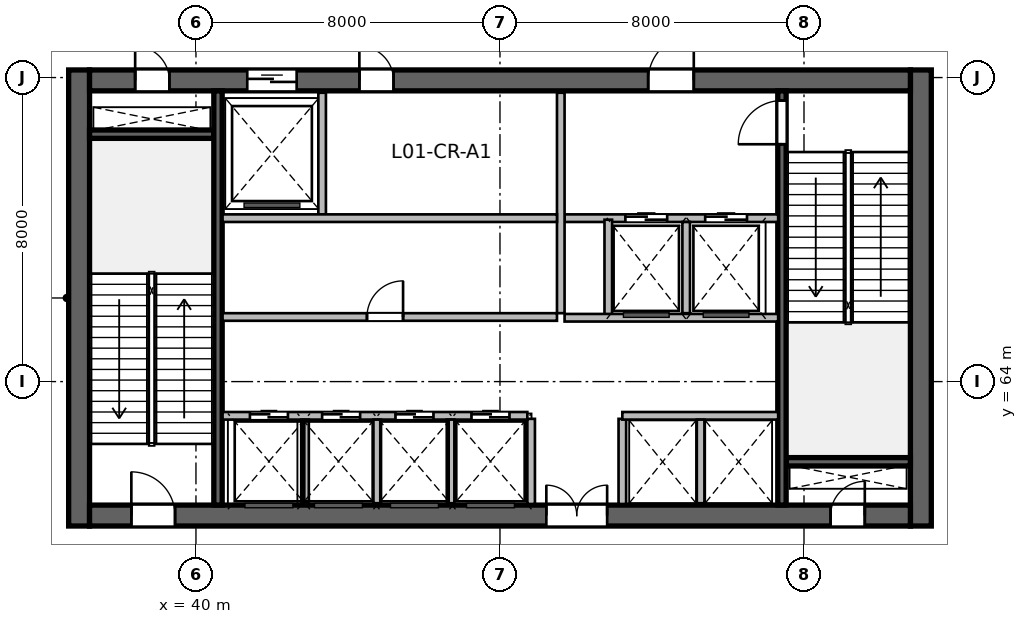
"""IFC4 building model, lengths in metres.
Left out: names, types, materials, properties, quantities, classifications, styles, units other than length and angle.
Written with IfcOpenShell. Run it as: python <this file> out.ifc"""

import sys

from ifc_helpers import new_model, si_unit, direction, frame, frame_2d, origin, place, context, subcontext, project, spatial, rectangle, extrude, source, transform, mapped, element, fill, save


model = new_model("IFC4")
c1 = context("Model", 3, precision=1e-05, world=origin(), true_north=direction((0.0, 1.0)))
c2 = subcontext(c1, "Body", "Model", "MODEL_VIEW")
j1 = project(units=[si_unit("LENGTHUNIT", "METRE"), si_unit("PLANEANGLEUNIT", "RADIAN")], contexts=[c1])
p1 = place(None, origin())
s1 = spatial("IfcSite", under=j1, at=p1, CompositionType="ELEMENT")
p2 = place(p1, origin())
s2 = spatial("IfcBuilding", under=s1, at=p2, CompositionType="ELEMENT")
p3 = place(p2, frame((0.0, 0.0, 6.0)))
s3 = spatial("IfcBuildingStorey", under=s2, at=p3, CompositionType="ELEMENT", Elevation=6.0)
m1 = source(origin(), c2, "Body", "SweptSolid", [
    extrude(rectangle(XDim=12.0, YDim=0.55, at=frame_2d((6.0, 0.0))), origin(), (0.0, 0.0, 1.0), 6.0),
])
for number, where, z_axis, x_axis in (
    (1, (36.925, 60.2, 0.0), (0.0, 0.0, 1.0), (0.0, 1.0, 0.0)),
    (2, (59.075, 60.2, 0.0), (0.0, 0.0, 1.0), (0.0, 1.0, 0.0)),
):
    element("IfcWall", number, at=place(p3, frame(where, z_axis=z_axis, x_axis=x_axis)), inside=s3, PredefinedType="SHEAR", context=c2, shape_type="MappedRepresentation", body=[
        mapped(m1, transform((0.0, 0.0, 0.0), scale=1.0)),
    ])
m2 = source(origin(), c2, "Body", "SweptSolid", [
    extrude(rectangle(XDim=21.6, YDim=0.55, at=frame_2d((10.8, 0.0))), origin(), (0.0, 0.0, 1.0), 6.0),
])
p4 = place(p3, frame((37.2, 60.475, 0.0), z_axis=(0.0, 0.0, 1.0), x_axis=(1.0, 0.0, 0.0)))
e3 = element("IfcWall", 3, at=p4, inside=s3, PredefinedType="SHEAR", context=c2, shape_type="MappedRepresentation", body=[
    mapped(m2, transform((0.0, 0.0, 0.0), scale=1.0)),
])
p5 = place(p4, frame((1.1, 0.0, 0.0)))
e4 = element("IfcOpeningElement", 4, at=p5, cuts=e3, PredefinedType="OPENING", context=c2, shape_type="SweptSolid", body=[
    extrude(rectangle(XDim=1.15, YDim=2.15, at=frame_2d((0.575, 1.075))), frame((0.0, 0.285, 0.0), z_axis=(0.0, -1.0, 0.0), x_axis=(1.0, 0.0, 0.0)), (0.0, 0.0, 1.0), 0.57),
])
p6 = place(p4, frame((19.5, 0.0, 0.0)))
e5 = element("IfcOpeningElement", 5, at=p6, cuts=e3, PredefinedType="OPENING", context=c2, shape_type="SweptSolid", body=[
    extrude(rectangle(XDim=0.9, YDim=2.1, at=frame_2d((0.45, 1.05))), frame((0.0, 0.285, 0.0), z_axis=(0.0, -1.0, 0.0), x_axis=(1.0, 0.0, 0.0)), (0.0, 0.0, 1.0), 0.57),
])
p7 = place(p4, frame((12.02, 0.0, 0.0)))
e6 = element("IfcOpeningElement", 6, at=p7, cuts=e3, PredefinedType="OPENING", context=c2, shape_type="SweptSolid", body=[
    extrude(rectangle(XDim=1.6, YDim=2.15, at=frame_2d((0.8, 1.075))), frame((0.0, 0.285, 0.0), z_axis=(0.0, -1.0, 0.0), x_axis=(1.0, 0.0, 0.0)), (0.0, 0.0, 1.0), 0.57),
])
p8 = place(p3, frame((37.2, 71.925, 0.0), z_axis=(0.0, 0.0, 1.0), x_axis=(1.0, 0.0, 0.0)))
e7 = element("IfcWall", 7, at=p8, inside=s3, PredefinedType="SHEAR", context=c2, shape_type="MappedRepresentation", body=[
    mapped(m2, transform((0.0, 0.0, 0.0), scale=1.0)),
])
p9 = place(p8, frame((1.2, 0.0, 0.0)))
e8 = element("IfcOpeningElement", 8, at=p9, cuts=e7, PredefinedType="OPENING", context=c2, shape_type="SweptSolid", body=[
    extrude(rectangle(XDim=0.9, YDim=2.1, at=frame_2d((0.45, 1.05))), frame((0.0, 0.285, 0.0), z_axis=(0.0, -1.0, 0.0), x_axis=(1.0, 0.0, 0.0)), (0.0, 0.0, 1.0), 0.57),
])
p10 = place(p8, frame((14.7, 0.0, 0.0)))
e9 = element("IfcOpeningElement", 9, at=p10, cuts=e7, PredefinedType="OPENING", context=c2, shape_type="SweptSolid", body=[
    extrude(rectangle(XDim=1.2, YDim=2.15, at=frame_2d((0.6, 1.075))), frame((0.0, 0.285, 0.0), z_axis=(0.0, -1.0, 0.0), x_axis=(1.0, 0.0, 0.0)), (0.0, 0.0, 1.0), 0.57),
])
p11 = place(p8, frame((4.15, 0.0, 0.0)))
e10 = element("IfcOpeningElement", 10, at=p11, cuts=e7, PredefinedType="OPENING", context=c2, shape_type="SweptSolid", body=[
    extrude(rectangle(XDim=1.3, YDim=2.15, at=frame_2d((0.65, 1.075))), frame((0.0, 0.285, 0.0), z_axis=(0.0, -1.0, 0.0), x_axis=(1.0, 0.0, 0.0)), (0.0, 0.0, 1.0), 0.57),
])
p12 = place(p8, frame((7.1, 0.0, 0.0)))
e11 = element("IfcOpeningElement", 11, at=p12, cuts=e7, PredefinedType="OPENING", context=c2, shape_type="SweptSolid", body=[
    extrude(rectangle(XDim=0.9, YDim=2.1, at=frame_2d((0.45, 1.05))), frame((0.0, 0.285, 0.0), z_axis=(0.0, -1.0, 0.0), x_axis=(1.0, 0.0, 0.0)), (0.0, 0.0, 1.0), 0.57),
])
m3 = source(origin(), c2, "Body", "SweptSolid", [
    extrude(rectangle(XDim=3.27, YDim=0.22, at=frame_2d((1.635, 0.0))), origin(), (0.0, 0.0, 1.0), 6.0),
])
for number, where, z_axis, x_axis in (
    (12, (37.2, 70.51, 0.0), (0.0, 0.0, 1.0), (1.0, 0.0, 0.0)),
    (13, (55.53, 61.89, 0.0), (0.0, 0.0, 1.0), (1.0, 0.0, 0.0)),
):
    element("IfcWall", number, at=place(p3, frame(where, z_axis=z_axis, x_axis=x_axis)), inside=s3, PredefinedType="SHEAR", context=c2, shape_type="MappedRepresentation", body=[
        mapped(m3, transform((0.0, 0.0, 0.0), scale=1.0)),
    ])
m4 = source(origin(), c2, "Body", "SweptSolid", [
    extrude(rectangle(XDim=10.9, YDim=0.22, at=frame_2d((5.45, 0.0))), origin(), (0.0, 0.0, 1.0), 6.0),
])
p13 = place(p3, frame((40.58, 60.75, 0.0), z_axis=(0.0, 0.0, 1.0), x_axis=(0.0, 1.0, 0.0)))
e14 = element("IfcWall", 14, at=p13, inside=s3, PredefinedType="SHEAR", context=c2, shape_type="MappedRepresentation", body=[
    mapped(m4, transform((0.0, 0.0, 0.0), scale=1.0)),
])
p14 = place(p3, frame((55.42, 60.75, 0.0), z_axis=(0.0, 0.0, 1.0), x_axis=(0.0, 1.0, 0.0)))
e15 = element("IfcWall", 15, at=p14, inside=s3, PredefinedType="SHEAR", context=c2, shape_type="MappedRepresentation", body=[
    mapped(m4, transform((0.0, 0.0, 0.0), scale=1.0)),
])
p15 = place(p14, frame((9.495, 0.0, 0.0)))
e16 = element("IfcOpeningElement", 16, at=p15, cuts=e15, PredefinedType="OPENING", context=c2, shape_type="SweptSolid", body=[
    extrude(rectangle(XDim=1.15, YDim=2.15, at=frame_2d((0.575, 1.075))), frame((0.0, 0.12, 0.0), z_axis=(0.0, -1.0, 0.0), x_axis=(1.0, 0.0, 0.0)), (0.0, 0.0, 1.0), 0.24),
])
m5 = source(origin(), c2, "Body", "SweptSolid", [
    extrude(rectangle(XDim=2.24, YDim=0.2, at=frame_2d((1.12, 0.0))), origin(), (0.0, 0.0, 1.0), 5.7),
])
for number, where, z_axis, x_axis in (
    (17, (48.82, 60.78, 0.0), (0.0, 0.0, 1.0), (0.0, 1.0, 0.0)),
    (18, (51.22, 60.78, 0.0), (0.0, 0.0, 1.0), (0.0, 1.0, 0.0)),
):
    element("IfcWall", number, at=place(p3, frame(where, z_axis=z_axis, x_axis=x_axis)), inside=s3, PredefinedType="SOLIDWALL", context=c2, shape_type="MappedRepresentation", body=[
        mapped(m5, transform((0.0, 0.0, 0.0), scale=1.0)),
    ])
m6 = source(origin(), c2, "Body", "SweptSolid", [
    extrude(rectangle(XDim=5.62, YDim=0.2, at=frame_2d((2.81, 0.0))), origin(), (0.0, 0.0, 1.0), 5.7),
])
p16 = place(p3, frame((49.7, 68.3, 0.0), z_axis=(0.0, 0.0, 1.0), x_axis=(1.0, 0.0, 0.0)))
e19 = element("IfcWall", 19, at=p16, inside=s3, PredefinedType="SOLIDWALL", context=c2, shape_type="MappedRepresentation", body=[
    mapped(m6, transform((0.0, 0.0, 0.0), scale=1.0)),
])
p17 = place(p16, frame((1.6, 0.0, 0.0)))
e20 = element("IfcOpeningElement", 20, at=p17, cuts=e19, PredefinedType="OPENING", context=c2, shape_type="SweptSolid", body=[
    extrude(rectangle(XDim=1.1, YDim=2.15, at=frame_2d((0.55, 1.075))), frame((0.0, 0.11, 0.0), z_axis=(0.0, -1.0, 0.0), x_axis=(1.0, 0.0, 0.0)), (0.0, 0.0, 1.0), 0.22),
])
p18 = place(p16, frame((3.7, 0.0, 0.0)))
e21 = element("IfcOpeningElement", 21, at=p18, cuts=e19, PredefinedType="OPENING", context=c2, shape_type="SweptSolid", body=[
    extrude(rectangle(XDim=1.1, YDim=2.15, at=frame_2d((0.55, 1.075))), frame((0.0, 0.11, 0.0), z_axis=(0.0, -1.0, 0.0), x_axis=(1.0, 0.0, 0.0)), (0.0, 0.0, 1.0), 0.22),
])
m7 = source(origin(), c2, "Body", "SweptSolid", [
    extrude(rectangle(XDim=5.8, YDim=0.2, at=frame_2d((2.9, 0.0))), origin(), (0.0, 0.0, 1.0), 5.7),
])
p19 = place(p3, frame((49.6, 65.8, 0.0), z_axis=(0.0, 0.0, 1.0), x_axis=(0.0, 1.0, 0.0)))
e22 = element("IfcWall", 22, at=p19, inside=s3, PredefinedType="SOLIDWALL", context=c2, shape_type="MappedRepresentation", body=[
    mapped(m7, transform((0.0, 0.0, 0.0), scale=1.0)),
])
m8 = source(origin(), c2, "Body", "SweptSolid", [
    extrude(rectangle(XDim=2.58, YDim=0.2, at=frame_2d((1.29, 0.0))), origin(), (0.0, 0.0, 1.0), 5.7),
])
p20 = place(p3, frame((50.85, 65.68, 0.0), z_axis=(0.0, 0.0, 1.0), x_axis=(0.0, 1.0, 0.0)))
e23 = element("IfcWall", 23, at=p20, inside=s3, PredefinedType="SOLIDWALL", context=c2, shape_type="MappedRepresentation", body=[
    mapped(m8, transform((0.0, 0.0, 0.0), scale=1.0)),
])
m9 = source(origin(), c2, "Body", "SweptSolid", [
    extrude(rectangle(XDim=2.4, YDim=0.2, at=frame_2d((1.2, 0.0))), origin(), (0.0, 0.0, 1.0), 5.7),
])
p21 = place(p3, frame((52.9, 65.8, 0.0), z_axis=(0.0, 0.0, 1.0), x_axis=(0.0, 1.0, 0.0)))
e24 = element("IfcWall", 24, at=p21, inside=s3, PredefinedType="SOLIDWALL", context=c2, shape_type="MappedRepresentation", body=[
    mapped(m9, transform((0.0, 0.0, 0.0), scale=1.0)),
])
p22 = place(p3, frame((49.7, 65.68, 0.0), z_axis=(0.0, 0.0, 1.0), x_axis=(1.0, 0.0, 0.0)))
e25 = element("IfcWall", 25, at=p22, inside=s3, PredefinedType="SOLIDWALL", context=c2, shape_type="MappedRepresentation", body=[
    mapped(m6, transform((0.0, 0.0, 0.0), scale=1.0)),
])
m10 = source(origin(), c2, "Body", "SweptSolid", [
    extrude(rectangle(XDim=3.2, YDim=0.2, at=frame_2d((1.6, 0.0))), origin(), (0.0, 0.0, 1.0), 5.7),
])
p23 = place(p3, frame((43.32, 68.4, 0.0), z_axis=(0.0, 0.0, 1.0), x_axis=(0.0, 1.0, 0.0)))
e26 = element("IfcWall", 26, at=p23, inside=s3, PredefinedType="SOLIDWALL", context=c2, shape_type="MappedRepresentation", body=[
    mapped(m10, transform((0.0, 0.0, 0.0), scale=1.0)),
])
m11 = source(origin(), c2, "Body", "SweptSolid", [
    extrude(rectangle(XDim=8.8, YDim=0.2, at=frame_2d((4.4, 0.0))), origin(), (0.0, 0.0, 1.0), 5.7),
])
p24 = place(p3, frame((40.7, 68.3, 0.0), z_axis=(0.0, 0.0, 1.0), x_axis=(1.0, 0.0, 0.0)))
e27 = element("IfcWall", 27, at=p24, inside=s3, PredefinedType="SOLIDWALL", context=c2, shape_type="MappedRepresentation", body=[
    mapped(m11, transform((0.0, 0.0, 0.0), scale=1.0)),
])
m12 = source(origin(), c2, "Body", "SweptSolid", [
    extrude(rectangle(XDim=8.02, YDim=0.2, at=frame_2d((4.01, 0.0))), origin(), (0.0, 0.0, 1.0), 5.7),
])
p25 = place(p3, frame((40.7, 63.1, 0.0), z_axis=(0.0, 0.0, 1.0), x_axis=(1.0, 0.0, 0.0)))
e28 = element("IfcWall", 28, at=p25, inside=s3, PredefinedType="SOLIDWALL", context=c2, shape_type="MappedRepresentation", body=[
    mapped(m12, transform((0.0, 0.0, 0.0), scale=1.0)),
])
p26 = place(p25, frame((0.72, 0.0, 0.0)))
e29 = element("IfcOpeningElement", 29, at=p26, cuts=e28, PredefinedType="OPENING", context=c2, shape_type="SweptSolid", body=[
    extrude(rectangle(XDim=1.0, YDim=2.15, at=frame_2d((0.5, 1.075))), frame((0.0, 0.11, 0.0), z_axis=(0.0, -1.0, 0.0), x_axis=(1.0, 0.0, 0.0)), (0.0, 0.0, 1.0), 0.22),
])
p27 = place(p25, frame((2.62, 0.0, 0.0)))
e30 = element("IfcOpeningElement", 30, at=p27, cuts=e28, PredefinedType="OPENING", context=c2, shape_type="SweptSolid", body=[
    extrude(rectangle(XDim=1.0, YDim=2.15, at=frame_2d((0.5, 1.075))), frame((0.0, 0.11, 0.0), z_axis=(0.0, -1.0, 0.0), x_axis=(1.0, 0.0, 0.0)), (0.0, 0.0, 1.0), 0.22),
])
p28 = place(p25, frame((4.55, 0.0, 0.0)))
e31 = element("IfcOpeningElement", 31, at=p28, cuts=e28, PredefinedType="OPENING", context=c2, shape_type="SweptSolid", body=[
    extrude(rectangle(XDim=1.0, YDim=2.15, at=frame_2d((0.5, 1.075))), frame((0.0, 0.11, 0.0), z_axis=(0.0, -1.0, 0.0), x_axis=(1.0, 0.0, 0.0)), (0.0, 0.0, 1.0), 0.22),
])
p29 = place(p25, frame((6.55, 0.0, 0.0)))
e32 = element("IfcOpeningElement", 32, at=p29, cuts=e28, PredefinedType="OPENING", context=c2, shape_type="SweptSolid", body=[
    extrude(rectangle(XDim=1.0, YDim=2.15, at=frame_2d((0.5, 1.075))), frame((0.0, 0.11, 0.0), z_axis=(0.0, -1.0, 0.0), x_axis=(1.0, 0.0, 0.0)), (0.0, 0.0, 1.0), 0.22),
])
m13 = source(origin(), c2, "Body", "SweptSolid", [
    extrude(rectangle(XDim=4.1, YDim=0.2, at=frame_2d((2.05, 0.0))), origin(), (0.0, 0.0, 1.0), 5.7),
])
p30 = place(p3, frame((51.22, 63.1, 0.0), z_axis=(0.0, 0.0, 1.0), x_axis=(1.0, 0.0, 0.0)))
e33 = element("IfcWall", 33, at=p30, inside=s3, PredefinedType="SOLIDWALL", context=c2, shape_type="MappedRepresentation", body=[
    mapped(m13, transform((0.0, 0.0, 0.0), scale=1.0)),
])
m14 = source(origin(), c2, "Body", "SweptSolid", [
    extrude(rectangle(XDim=2.2, YDim=0.2, at=frame_2d((1.1, 0.0))), origin(), (0.0, 0.0, 1.0), 5.7),
])
for number, where, z_axis, x_axis in (
    (34, (42.87, 60.8, 0.0), (0.0, 0.0, 1.0), (0.0, 1.0, 0.0)),
    (35, (44.77, 60.8, 0.0), (0.0, 0.0, 1.0), (0.0, 1.0, 0.0)),
    (36, (46.7, 60.8, 0.0), (0.0, 0.0, 1.0), (0.0, 1.0, 0.0)),
    (37, (53.28, 60.8, 0.0), (0.0, 0.0, 1.0), (0.0, 1.0, 0.0)),
):
    element("IfcWall", number, at=place(p3, frame(where, z_axis=z_axis, x_axis=x_axis)), inside=s3, PredefinedType="SOLIDWALL", context=c2, shape_type="MappedRepresentation", body=[
        mapped(m14, transform((0.0, 0.0, 0.0), scale=1.0)),
    ])
p31 = place(p3, frame((40.7, 65.7, 0.0), z_axis=(0.0, 0.0, 1.0), x_axis=(1.0, 0.0, 0.0)))
e38 = element("IfcWall", 38, at=p31, inside=s3, PredefinedType="SOLIDWALL", context=c2, shape_type="MappedRepresentation", body=[
    mapped(m11, transform((0.0, 0.0, 0.0), scale=1.0)),
])
p32 = place(p31, frame((3.8, 0.0, 0.0)))
e39 = element("IfcOpeningElement", 39, at=p32, cuts=e38, PredefinedType="OPENING", context=c2, shape_type="SweptSolid", body=[
    extrude(rectangle(XDim=0.95, YDim=2.15, at=frame_2d((0.475, 1.075))), frame((0.0, 0.11, 0.0), z_axis=(0.0, -1.0, 0.0), x_axis=(1.0, 0.0, 0.0)), (0.0, 0.0, 1.0), 0.22),
])
m15 = source(origin(), c2, "Body", "SweptSolid", [
    extrude(rectangle(XDim=1.15, YDim=2.15, at=frame_2d((0.575, 1.075))), frame((0.0, 0.025, 0.0), z_axis=(0.0, -1.0, 0.0), x_axis=(1.0, 0.0, 0.0)), (0.0, 0.0, 1.0), 0.05),
])
p33 = place(p5, origin())
e40 = element("IfcDoor", 40, at=p33, inside=s3, OperationType="SINGLE_SWING_LEFT", PredefinedType="DOOR", context=c2, shape_type="MappedRepresentation", body=[
    mapped(m15, transform((0.0, 0.0, 0.0), scale=1.0)),
])
fill(e4, e40)
m16 = source(origin(), c2, "Body", "SweptSolid", [
    extrude(rectangle(XDim=0.9, YDim=2.1, at=frame_2d((0.45, 1.05))), frame((0.0, 0.025, 0.0), z_axis=(0.0, -1.0, 0.0), x_axis=(1.0, 0.0, 0.0)), (0.0, 0.0, 1.0), 0.05),
])
p34 = place(p9, origin())
e41 = element("IfcDoor", 41, at=p34, inside=s3, OperationType="SINGLE_SWING_LEFT", PredefinedType="DOOR", context=c2, shape_type="MappedRepresentation", body=[
    mapped(m16, transform((0.0, 0.0, 0.0), scale=1.0)),
])
fill(e8, e41)
p35 = place(p6, origin())
e42 = element("IfcDoor", 42, at=p35, inside=s3, OperationType="SINGLE_SWING_RIGHT", PredefinedType="DOOR", context=c2, shape_type="MappedRepresentation", body=[
    mapped(m16, transform((0.0, 0.0, 0.0), scale=1.0)),
])
fill(e5, e42)
p36 = place(p15, origin())
e43 = element("IfcDoor", 43, at=p36, inside=s3, OperationType="SINGLE_SWING_LEFT", PredefinedType="DOOR", context=c2, shape_type="MappedRepresentation", body=[
    mapped(m15, transform((0.0, 0.0, 0.0), scale=1.0)),
])
fill(e16, e43)
m17 = source(origin(), c2, "Body", "SweptSolid", [
    extrude(rectangle(XDim=1.6, YDim=2.15, at=frame_2d((0.8, 1.075))), frame((0.0, 0.025, 0.0), z_axis=(0.0, -1.0, 0.0), x_axis=(1.0, 0.0, 0.0)), (0.0, 0.0, 1.0), 0.05),
])
p37 = place(p7, origin())
e44 = element("IfcDoor", 44, at=p37, inside=s3, OperationType="DOUBLE_DOOR_SINGLE_SWING", PredefinedType="DOOR", context=c2, shape_type="MappedRepresentation", body=[
    mapped(m17, transform((0.0, 0.0, 0.0), scale=1.0)),
])
fill(e6, e44)
m18 = source(origin(), c2, "Body", "SweptSolid", [
    extrude(rectangle(XDim=1.2, YDim=2.15, at=frame_2d((0.6, 1.075))), frame((0.0, 0.025, 0.0), z_axis=(0.0, -1.0, 0.0), x_axis=(1.0, 0.0, 0.0)), (0.0, 0.0, 1.0), 0.05),
])
p38 = place(p10, origin())
e45 = element("IfcDoor", 45, at=p38, inside=s3, OperationType="SINGLE_SWING_RIGHT", PredefinedType="DOOR", context=c2, shape_type="MappedRepresentation", body=[
    mapped(m18, transform((0.0, 0.0, 0.0), scale=1.0)),
])
fill(e9, e45)
m19 = source(origin(), c2, "Body", "SweptSolid", [
    extrude(rectangle(XDim=1.1, YDim=2.15, at=frame_2d((0.55, 1.075))), frame((0.0, 0.025, 0.0), z_axis=(0.0, -1.0, 0.0), x_axis=(1.0, 0.0, 0.0)), (0.0, 0.0, 1.0), 0.05),
])
p39 = place(p17, origin())
e46 = element("IfcDoor", 46, at=p39, inside=s3, OperationType="DOUBLE_DOOR_SLIDING", PredefinedType="DOOR", context=c2, shape_type="MappedRepresentation", body=[
    mapped(m19, transform((0.0, 0.0, 0.0), scale=1.0)),
])
fill(e20, e46)
p40 = place(p18, origin())
e47 = element("IfcDoor", 47, at=p40, inside=s3, OperationType="DOUBLE_DOOR_SLIDING", PredefinedType="DOOR", context=c2, shape_type="MappedRepresentation", body=[
    mapped(m19, transform((0.0, 0.0, 0.0), scale=1.0)),
])
fill(e21, e47)
m20 = source(origin(), c2, "Body", "SweptSolid", [
    extrude(rectangle(XDim=1.3, YDim=2.15, at=frame_2d((0.65, 1.075))), frame((0.0, 0.025, 0.0), z_axis=(0.0, -1.0, 0.0), x_axis=(1.0, 0.0, 0.0)), (0.0, 0.0, 1.0), 0.05),
])
p41 = place(p11, origin())
e48 = element("IfcDoor", 48, at=p41, inside=s3, OperationType="DOUBLE_DOOR_SLIDING", PredefinedType="DOOR", context=c2, shape_type="MappedRepresentation", body=[
    mapped(m20, transform((0.0, 0.0, 0.0), scale=1.0)),
])
fill(e10, e48)
p42 = place(p12, origin())
e49 = element("IfcDoor", 49, at=p42, inside=s3, OperationType="SINGLE_SWING_LEFT", PredefinedType="DOOR", context=c2, shape_type="MappedRepresentation", body=[
    mapped(m16, transform((0.0, 0.0, 0.0), scale=1.0)),
])
fill(e11, e49)
m21 = source(origin(), c2, "Body", "SweptSolid", [
    extrude(rectangle(XDim=1.0, YDim=2.15, at=frame_2d((0.5, 1.075))), frame((0.0, 0.025, 0.0), z_axis=(0.0, -1.0, 0.0), x_axis=(1.0, 0.0, 0.0)), (0.0, 0.0, 1.0), 0.05),
])
p43 = place(p26, origin())
e50 = element("IfcDoor", 50, at=p43, inside=s3, OperationType="DOUBLE_DOOR_SLIDING", PredefinedType="DOOR", context=c2, shape_type="MappedRepresentation", body=[
    mapped(m21, transform((0.0, 0.0, 0.0), scale=1.0)),
])
fill(e29, e50)
p44 = place(p27, origin())
e51 = element("IfcDoor", 51, at=p44, inside=s3, OperationType="DOUBLE_DOOR_SLIDING", PredefinedType="DOOR", context=c2, shape_type="MappedRepresentation", body=[
    mapped(m21, transform((0.0, 0.0, 0.0), scale=1.0)),
])
fill(e30, e51)
p45 = place(p28, origin())
e52 = element("IfcDoor", 52, at=p45, inside=s3, OperationType="DOUBLE_DOOR_SLIDING", PredefinedType="DOOR", context=c2, shape_type="MappedRepresentation", body=[
    mapped(m21, transform((0.0, 0.0, 0.0), scale=1.0)),
])
fill(e31, e52)
p46 = place(p29, origin())
e53 = element("IfcDoor", 53, at=p46, inside=s3, OperationType="DOUBLE_DOOR_SLIDING", PredefinedType="DOOR", context=c2, shape_type="MappedRepresentation", body=[
    mapped(m21, transform((0.0, 0.0, 0.0), scale=1.0)),
])
fill(e32, e53)
m22 = source(origin(), c2, "Body", "SweptSolid", [
    extrude(rectangle(XDim=0.95, YDim=2.15, at=frame_2d((0.475, 1.075))), frame((0.0, 0.025, 0.0), z_axis=(0.0, -1.0, 0.0), x_axis=(1.0, 0.0, 0.0)), (0.0, 0.0, 1.0), 0.05),
])
p47 = place(p32, origin())
e54 = element("IfcDoor", 54, at=p47, inside=s3, OperationType="SINGLE_SWING_RIGHT", PredefinedType="DOOR", context=c2, shape_type="MappedRepresentation", body=[
    mapped(m22, transform((0.0, 0.0, 0.0), scale=1.0)),
])
fill(e39, e54)
save(model, sys.argv[1])
